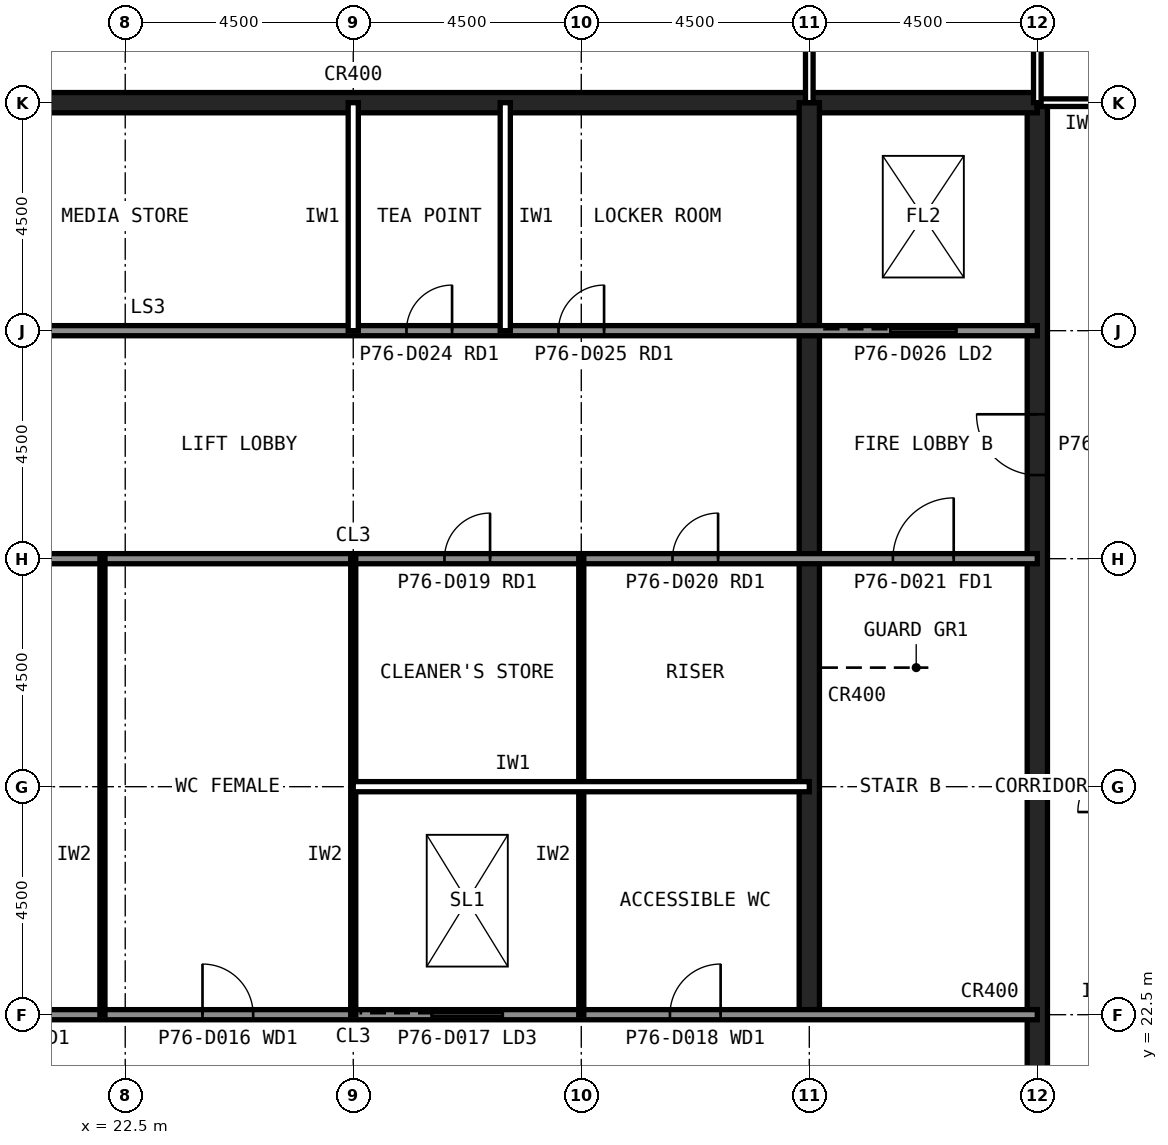
"""IFC4 building model, lengths in metres.
Left out: names, types, materials, properties, quantities, classifications, styles, units other than length and angle.
Written with IfcOpenShell. Run it as: python <this file> out.ifc"""

import sys

from ifc_helpers import new_model, si_unit, direction, frame, frame_2d, origin, place, context, subcontext, project, spatial, polyline, rectangle, outline, extrude, element, fill, save


model = new_model("IFC4")
c1 = context("Model", 3, precision=1e-05, world=origin(), true_north=direction((0.0, 1.0)))
c2 = subcontext(c1, "Body", "Model", "MODEL_VIEW")
j1 = project(units=[si_unit("LENGTHUNIT", "METRE"), si_unit("PLANEANGLEUNIT", "RADIAN")], contexts=[c1])
p1 = place(None, origin())
s1 = spatial("IfcSite", under=j1, at=p1, CompositionType="ELEMENT")
p2 = place(p1, origin())
s2 = spatial("IfcBuilding", under=s1, at=p2, CompositionType="ELEMENT")
p3 = place(p2, frame((0.0, 0.0, 320.1)))
s3 = spatial("IfcBuildingStorey", under=s2, at=p3, CompositionType="ELEMENT", Elevation=320.1)
p4 = place(p3, frame((40.5, 13.5, 0.0), z_axis=(0.0, 0.0, 1.0), x_axis=(0.0, 1.0, 0.0)))
e1 = element("IfcWall", 1, at=p4, inside=s3, PredefinedType="SHEAR", context=c2, shape_type="SweptSolid", body=[
    extrude(outline(polyline([(0.0, 0.0), (27.0, 0.0), (27.0, 17.377), (0.0, 9.277), (0.0, 0.0)])), frame((0.0, 0.2, 0.0), z_axis=(0.0, -1.0, 0.0), x_axis=(1.0, 0.0, 0.0)), (0.0, 0.0, 1.0), 0.4),
])
p5 = place(p4, frame((5.85, 0.0, 0.0)))
e2 = element("IfcOpeningElement", 2, at=p5, cuts=e1, PredefinedType="OPENING", context=c2, shape_type="SweptSolid", body=[
    extrude(rectangle(XDim=1.8, YDim=2.1, at=frame_2d((0.9, 1.05))), frame((0.0, 0.21, 0.0), z_axis=(0.0, -1.0, 0.0), x_axis=(1.0, 0.0, 0.0)), (0.0, 0.0, 1.0), 0.42),
])
p6 = place(p4, frame((19.65, 0.0, 0.0)))
e3 = element("IfcOpeningElement", 3, at=p6, cuts=e1, PredefinedType="OPENING", context=c2, shape_type="SweptSolid", body=[
    extrude(rectangle(XDim=1.2, YDim=2.1, at=frame_2d((0.6, 1.05))), frame((0.0, 0.21, 0.0), z_axis=(0.0, -1.0, 0.0), x_axis=(1.0, 0.0, 0.0)), (0.0, 0.0, 1.0), 0.42),
])
p7 = place(p3, frame((40.5, 40.5, 0.0), z_axis=(0.0, 0.0, 1.0), x_axis=(-1.0, 0.0, 0.0)))
e4 = element("IfcWall", 4, at=p7, inside=s3, PredefinedType="SHEAR", context=c2, shape_type="SweptSolid", body=[
    extrude(rectangle(XDim=27.0, YDim=0.4, at=frame_2d((13.5, 0.0))), origin(), (0.0, 0.0, 1.0), 17.377),
])
p8 = place(p3, frame((36.0, 22.5, 0.0), z_axis=(0.0, 0.0, 1.0), x_axis=(0.0, 1.0, 0.0)))
e5 = element("IfcWall", 5, at=p8, inside=s3, PredefinedType="SHEAR", context=c2, shape_type="SweptSolid", body=[
    extrude(outline(polyline([(0.0, 0.0), (18.0, 0.0), (18.0, 17.377), (0.0, 11.977), (0.0, 0.0)])), frame((0.0, 0.2, 0.0), z_axis=(0.0, -1.0, 0.0), x_axis=(1.0, 0.0, 0.0)), (0.0, 0.0, 1.0), 0.4),
])
p9 = place(p3, frame((13.5, 36.0, 0.0), z_axis=(0.0, 0.0, 1.0), x_axis=(1.0, 0.0, 0.0)))
e6 = element("IfcWall", 6, at=p9, inside=s3, PredefinedType="SOLIDWALL", context=c2, shape_type="SweptSolid", body=[
    extrude(rectangle(XDim=27.0, YDim=0.2, at=frame_2d((13.5, 0.0))), origin(), (0.0, 0.0, 1.0), 15.877),
])
p10 = place(p9, frame((1.8, 0.0, 0.0)))
e7 = element("IfcOpeningElement", 7, at=p10, cuts=e6, PredefinedType="OPENING", context=c2, shape_type="SweptSolid", body=[
    extrude(rectangle(XDim=0.9, YDim=2.1, at=frame_2d((0.45, 1.05))), frame((0.0, 0.11, 0.0), z_axis=(0.0, -1.0, 0.0), x_axis=(1.0, 0.0, 0.0)), (0.0, 0.0, 1.0), 0.22),
])
p11 = place(p9, frame((5.55, 0.0, 0.0)))
e8 = element("IfcOpeningElement", 8, at=p11, cuts=e6, PredefinedType="OPENING", context=c2, shape_type="SweptSolid", body=[
    extrude(rectangle(XDim=0.9, YDim=2.1, at=frame_2d((0.45, 1.05))), frame((0.0, 0.11, 0.0), z_axis=(0.0, -1.0, 0.0), x_axis=(1.0, 0.0, 0.0)), (0.0, 0.0, 1.0), 0.22),
])
p12 = place(p9, frame((14.55, 0.0, 0.0)))
e9 = element("IfcOpeningElement", 9, at=p12, cuts=e6, PredefinedType="OPENING", context=c2, shape_type="SweptSolid", body=[
    extrude(rectangle(XDim=0.9, YDim=2.1, at=frame_2d((0.45, 1.05))), frame((0.0, 0.11, 0.0), z_axis=(0.0, -1.0, 0.0), x_axis=(1.0, 0.0, 0.0)), (0.0, 0.0, 1.0), 0.22),
])
p13 = place(p9, frame((17.55, 0.0, 0.0)))
e10 = element("IfcOpeningElement", 10, at=p13, cuts=e6, PredefinedType="OPENING", context=c2, shape_type="SweptSolid", body=[
    extrude(rectangle(XDim=0.9, YDim=2.1, at=frame_2d((0.45, 1.05))), frame((0.0, 0.11, 0.0), z_axis=(0.0, -1.0, 0.0), x_axis=(1.0, 0.0, 0.0)), (0.0, 0.0, 1.0), 0.22),
])
p14 = place(p9, frame((24.1, 0.0, 0.0)))
e11 = element("IfcOpeningElement", 11, at=p14, cuts=e6, PredefinedType="OPENING", context=c2, shape_type="SweptSolid", body=[
    extrude(rectangle(XDim=1.3, YDim=2.2, at=frame_2d((0.65, 1.1))), frame((0.0, 0.11, 0.0), z_axis=(0.0, -1.0, 0.0), x_axis=(1.0, 0.0, 0.0)), (0.0, 0.0, 1.0), 0.22),
])
p15 = place(p3, frame((13.5, 22.5, 0.0), z_axis=(0.0, 0.0, 1.0), x_axis=(1.0, 0.0, 0.0)))
e12 = element("IfcWall", 12, at=p15, inside=s3, PredefinedType="SOLIDWALL", context=c2, shape_type="SweptSolid", body=[
    extrude(rectangle(XDim=27.0, YDim=0.2, at=frame_2d((13.5, 0.0))), origin(), (0.0, 0.0, 1.0), 11.827),
])
p16 = place(p15, frame((1.65, 0.0, 0.0)))
e13 = element("IfcOpeningElement", 13, at=p16, cuts=e12, PredefinedType="OPENING", context=c2, shape_type="SweptSolid", body=[
    extrude(rectangle(XDim=1.2, YDim=2.1, at=frame_2d((0.6, 1.05))), frame((0.0, 0.11, 0.0), z_axis=(0.0, -1.0, 0.0), x_axis=(1.0, 0.0, 0.0)), (0.0, 0.0, 1.0), 0.22),
])
p17 = place(p15, frame((6.025, 0.0, 0.0)))
e14 = element("IfcOpeningElement", 14, at=p17, cuts=e12, PredefinedType="OPENING", context=c2, shape_type="SweptSolid", body=[
    extrude(rectangle(XDim=1.0, YDim=2.1, at=frame_2d((0.5, 1.05))), frame((0.0, 0.11, 0.0), z_axis=(0.0, -1.0, 0.0), x_axis=(1.0, 0.0, 0.0)), (0.0, 0.0, 1.0), 0.22),
])
p18 = place(p15, frame((10.525, 0.0, 0.0)))
e15 = element("IfcOpeningElement", 15, at=p18, cuts=e12, PredefinedType="OPENING", context=c2, shape_type="SweptSolid", body=[
    extrude(rectangle(XDim=1.0, YDim=2.1, at=frame_2d((0.5, 1.05))), frame((0.0, 0.11, 0.0), z_axis=(0.0, -1.0, 0.0), x_axis=(1.0, 0.0, 0.0)), (0.0, 0.0, 1.0), 0.22),
])
p19 = place(p15, frame((19.75, 0.0, 0.0)))
e16 = element("IfcOpeningElement", 16, at=p19, cuts=e12, PredefinedType="OPENING", context=c2, shape_type="SweptSolid", body=[
    extrude(rectangle(XDim=1.0, YDim=2.1, at=frame_2d((0.5, 1.05))), frame((0.0, 0.11, 0.0), z_axis=(0.0, -1.0, 0.0), x_axis=(1.0, 0.0, 0.0)), (0.0, 0.0, 1.0), 0.22),
])
p20 = place(p15, frame((15.05, 0.0, 0.0)))
e17 = element("IfcOpeningElement", 17, at=p20, cuts=e12, PredefinedType="OPENING", context=c2, shape_type="SweptSolid", body=[
    extrude(rectangle(XDim=1.4, YDim=2.4, at=frame_2d((0.7, 1.2))), frame((0.0, 0.11, 0.0), z_axis=(0.0, -1.0, 0.0), x_axis=(1.0, 0.0, 0.0)), (0.0, 0.0, 1.0), 0.22),
])
p21 = place(p3, frame((13.5, 31.5, 0.0), z_axis=(0.0, 0.0, 1.0), x_axis=(1.0, 0.0, 0.0)))
e18 = element("IfcWall", 18, at=p21, inside=s3, PredefinedType="SOLIDWALL", context=c2, shape_type="SweptSolid", body=[
    extrude(rectangle(XDim=27.0, YDim=0.2, at=frame_2d((13.5, 0.0))), origin(), (0.0, 0.0, 1.0), 14.527),
])
p22 = place(p21, frame((24.15, 0.0, 0.0)))
e19 = element("IfcOpeningElement", 19, at=p22, cuts=e18, PredefinedType="OPENING", context=c2, shape_type="SweptSolid", body=[
    extrude(rectangle(XDim=1.2, YDim=2.1, at=frame_2d((0.6, 1.05))), frame((0.0, 0.11, 0.0), z_axis=(0.0, -1.0, 0.0), x_axis=(1.0, 0.0, 0.0)), (0.0, 0.0, 1.0), 0.22),
])
p23 = place(p21, frame((15.3, 0.0, 0.0)))
e20 = element("IfcOpeningElement", 20, at=p23, cuts=e18, PredefinedType="OPENING", context=c2, shape_type="SweptSolid", body=[
    extrude(rectangle(XDim=0.9, YDim=2.1, at=frame_2d((0.45, 1.05))), frame((0.0, 0.11, 0.0), z_axis=(0.0, -1.0, 0.0), x_axis=(1.0, 0.0, 0.0)), (0.0, 0.0, 1.0), 0.22),
])
p24 = place(p21, frame((19.8, 0.0, 0.0)))
e21 = element("IfcOpeningElement", 21, at=p24, cuts=e18, PredefinedType="OPENING", context=c2, shape_type="SweptSolid", body=[
    extrude(rectangle(XDim=0.9, YDim=2.1, at=frame_2d((0.45, 1.05))), frame((0.0, 0.11, 0.0), z_axis=(0.0, -1.0, 0.0), x_axis=(1.0, 0.0, 0.0)), (0.0, 0.0, 1.0), 0.22),
])
p25 = place(p3, frame((36.261, 54.63, 0.0), z_axis=(0.0, 0.0, 1.0), x_axis=(0.707106781187, -0.707106781187, 0.0)))
e22 = element("IfcWall", 22, at=p25, inside=s3, PredefinedType="SOLIDWALL", context=c2, shape_type="SweptSolid", body=[
    extrude(outline(polyline([(0.0, 0.0), (25.978, 0.0), (25.978, 18.278), (0.0, 23.789), (0.0, 0.0)])), frame((0.0, 0.15, 0.0), z_axis=(0.0, -1.0, 0.0), x_axis=(1.0, 0.0, 0.0)), (0.0, 0.0, 1.0), 0.3),
])
p26 = place(p25, frame((0.424, 0.0, 1.2)))
e23 = element("IfcOpeningElement", 23, at=p26, cuts=e22, PredefinedType="OPENING", context=c2, shape_type="SweptSolid", body=[
    extrude(rectangle(XDim=2.4, YDim=2.4, at=frame_2d((1.2, 1.2))), frame((0.0, 0.16, 0.0), z_axis=(0.0, -1.0, 0.0), x_axis=(1.0, 0.0, 0.0)), (0.0, 0.0, 1.0), 0.32),
])
p27 = place(p25, frame((3.671, 0.0, 1.2)))
e24 = element("IfcOpeningElement", 24, at=p27, cuts=e22, PredefinedType="OPENING", context=c2, shape_type="SweptSolid", body=[
    extrude(rectangle(XDim=2.4, YDim=2.4, at=frame_2d((1.2, 1.2))), frame((0.0, 0.16, 0.0), z_axis=(0.0, -1.0, 0.0), x_axis=(1.0, 0.0, 0.0)), (0.0, 0.0, 1.0), 0.32),
])
p28 = place(p25, frame((6.918, 0.0, 11.3)))
e25 = element("IfcOpeningElement", 25, at=p28, cuts=e22, PredefinedType="OPENING", context=c2, shape_type="SweptSolid", body=[
    extrude(rectangle(XDim=2.4, YDim=2.4, at=frame_2d((1.2, 1.2))), frame((0.0, 0.16, 0.0), z_axis=(0.0, -1.0, 0.0), x_axis=(1.0, 0.0, 0.0)), (0.0, 0.0, 1.0), 0.32),
])
p29 = place(p25, frame((10.165, 0.0, 11.15)))
e26 = element("IfcOpeningElement", 26, at=p29, cuts=e22, PredefinedType="OPENING", context=c2, shape_type="SweptSolid", body=[
    extrude(rectangle(XDim=2.4, YDim=2.4, at=frame_2d((1.2, 1.2))), frame((0.0, 0.16, 0.0), z_axis=(0.0, -1.0, 0.0), x_axis=(1.0, 0.0, 0.0)), (0.0, 0.0, 1.0), 0.32),
])
p30 = place(p25, frame((13.412, 0.0, 1.2)))
e27 = element("IfcOpeningElement", 27, at=p30, cuts=e22, PredefinedType="OPENING", context=c2, shape_type="SweptSolid", body=[
    extrude(rectangle(XDim=2.4, YDim=2.4, at=frame_2d((1.2, 1.2))), frame((0.0, 0.16, 0.0), z_axis=(0.0, -1.0, 0.0), x_axis=(1.0, 0.0, 0.0)), (0.0, 0.0, 1.0), 0.32),
])
p31 = place(p25, frame((16.66, 0.0, 1.2)))
e28 = element("IfcOpeningElement", 28, at=p31, cuts=e22, PredefinedType="OPENING", context=c2, shape_type="SweptSolid", body=[
    extrude(rectangle(XDim=2.4, YDim=2.4, at=frame_2d((1.2, 1.2))), frame((0.0, 0.16, 0.0), z_axis=(0.0, -1.0, 0.0), x_axis=(1.0, 0.0, 0.0)), (0.0, 0.0, 1.0), 0.32),
])
p32 = place(p25, frame((19.907, 0.0, 1.2)))
e29 = element("IfcOpeningElement", 29, at=p32, cuts=e22, PredefinedType="OPENING", context=c2, shape_type="SweptSolid", body=[
    extrude(rectangle(XDim=2.4, YDim=2.4, at=frame_2d((1.2, 1.2))), frame((0.0, 0.16, 0.0), z_axis=(0.0, -1.0, 0.0), x_axis=(1.0, 0.0, 0.0)), (0.0, 0.0, 1.0), 0.32),
])
p33 = place(p25, frame((23.154, 0.0, 1.2)))
e30 = element("IfcOpeningElement", 30, at=p33, cuts=e22, PredefinedType="OPENING", context=c2, shape_type="SweptSolid", body=[
    extrude(rectangle(XDim=2.4, YDim=2.4, at=frame_2d((1.2, 1.2))), frame((0.0, 0.16, 0.0), z_axis=(0.0, -1.0, 0.0), x_axis=(1.0, 0.0, 0.0)), (0.0, 0.0, 1.0), 0.32),
])
for number, where, z_axis, x_axis in (
    (31, (27.0, 36.0, 0.0), (0.0, 0.0, 1.0), (0.0, 1.0, 0.0)),
    (32, (30.0, 36.0, 0.0), (0.0, 0.0, 1.0), (0.0, 1.0, 0.0)),
):
    element("IfcWall", number, at=place(p3, frame(where, z_axis=z_axis, x_axis=x_axis)), inside=s3, PredefinedType="PARTITIONING", context=c2, shape_type="SweptSolid", body=[
        extrude(rectangle(XDim=4.5, YDim=0.2, at=frame_2d((2.25, 0.0))), origin(), (0.0, 0.0, 1.0), 4.2),
    ])
for number, where, z_axis, x_axis in (
    (33, (22.05, 22.5, 0.0), (0.0, 0.0, 1.0), (0.0, 1.0, 0.0)),
    (34, (27.0, 22.5, 0.0), (0.0, 0.0, 1.0), (0.0, 1.0, 0.0)),
    (35, (31.5, 22.5, 0.0), (0.0, 0.0, 1.0), (0.0, 1.0, 0.0)),
):
    element("IfcWall", number, at=place(p3, frame(where, z_axis=z_axis, x_axis=x_axis)), inside=s3, PredefinedType="PLUMBINGWALL", context=c2, shape_type="SweptSolid", body=[
        extrude(rectangle(XDim=9.0, YDim=0.1, at=frame_2d((4.5, 0.0))), origin(), (0.0, 0.0, 1.0), 4.246),
    ])
p34 = place(p3, frame((27.0, 27.0, 0.0), z_axis=(0.0, 0.0, 1.0), x_axis=(1.0, 0.0, 0.0)))
e36 = element("IfcWall", 36, at=p34, inside=s3, PredefinedType="PARTITIONING", context=c2, shape_type="SweptSolid", body=[
    extrude(rectangle(XDim=9.0, YDim=0.2, at=frame_2d((4.5, 0.0))), origin(), (0.0, 0.0, 1.0), 4.2),
])
p35 = place(p3, frame((42.3, 40.5, 0.0), z_axis=(0.0, 0.0, 1.0), x_axis=(-1.0, 0.0, 0.0)))
e37 = element("IfcWall", 37, at=p35, inside=s3, PredefinedType="PARTITIONING", context=c2, shape_type="SweptSolid", body=[
    extrude(rectangle(XDim=1.81, YDim=0.15, at=frame_2d((0.905, 0.0))), origin(), (0.0, 0.0, 1.0), 4.246),
])
p36 = place(p3, frame((36.0, 40.5, 0.0), z_axis=(0.0, 0.0, 1.0), x_axis=(0.0, 1.0, 0.0)))
e38 = element("IfcWall", 38, at=p36, inside=s3, PredefinedType="PARTITIONING", context=c2, shape_type="SweptSolid", body=[
    extrude(rectangle(XDim=4.5, YDim=0.15, at=frame_2d((2.25, 0.0))), origin(), (0.0, 0.0, 1.0), 4.246),
])
p37 = place(p3, frame((40.5, 49.08, 0.0), z_axis=(0.0, 0.0, 1.0), x_axis=(0.0, -1.0, 0.0)))
e39 = element("IfcWall", 39, at=p37, inside=s3, PredefinedType="PARTITIONING", context=c2, shape_type="SweptSolid", body=[
    extrude(rectangle(XDim=8.58, YDim=0.15, at=frame_2d((4.29, 0.0))), origin(), (0.0, 0.0, 1.0), 4.246),
])
p38 = place(p37, frame((3.79, 0.0, 0.0)))
e40 = element("IfcOpeningElement", 40, at=p38, cuts=e39, PredefinedType="OPENING", context=c2, shape_type="SweptSolid", body=[
    extrude(rectangle(XDim=1.0, YDim=2.1, at=frame_2d((0.5, 1.05))), frame((0.0, 0.085, 0.0), z_axis=(0.0, -1.0, 0.0), x_axis=(1.0, 0.0, 0.0)), (0.0, 0.0, 1.0), 0.17),
])
p39 = place(p6, origin())
e41 = element("IfcDoor", 41, at=p39, inside=s3, OperationType="SINGLE_SWING_RIGHT", PredefinedType="DOOR", context=c2, shape_type="SweptSolid", body=[
    extrude(rectangle(XDim=1.2, YDim=2.1, at=frame_2d((0.6, 1.05))), frame((0.0, 0.025, 0.0), z_axis=(0.0, -1.0, 0.0), x_axis=(1.0, 0.0, 0.0)), (0.0, 0.0, 1.0), 0.05),
])
fill(e3, e41)
p40 = place(p22, origin())
e42 = element("IfcDoor", 42, at=p40, inside=s3, OperationType="SINGLE_SWING_RIGHT", PredefinedType="DOOR", context=c2, shape_type="SweptSolid", body=[
    extrude(rectangle(XDim=1.2, YDim=2.1, at=frame_2d((0.6, 1.05))), frame((0.0, 0.025, 0.0), z_axis=(0.0, -1.0, 0.0), x_axis=(1.0, 0.0, 0.0)), (0.0, 0.0, 1.0), 0.05),
])
fill(e19, e42)
p41 = place(p18, origin())
e43 = element("IfcDoor", 43, at=p41, inside=s3, OperationType="SINGLE_SWING_LEFT", PredefinedType="DOOR", context=c2, shape_type="SweptSolid", body=[
    extrude(rectangle(XDim=1.0, YDim=2.1, at=frame_2d((0.5, 1.05))), frame((0.0, 0.025, 0.0), z_axis=(0.0, -1.0, 0.0), x_axis=(1.0, 0.0, 0.0)), (0.0, 0.0, 1.0), 0.05),
])
fill(e15, e43)
p42 = place(p19, origin())
e44 = element("IfcDoor", 44, at=p42, inside=s3, OperationType="SINGLE_SWING_RIGHT", PredefinedType="DOOR", context=c2, shape_type="SweptSolid", body=[
    extrude(rectangle(XDim=1.0, YDim=2.1, at=frame_2d((0.5, 1.05))), frame((0.0, 0.025, 0.0), z_axis=(0.0, -1.0, 0.0), x_axis=(1.0, 0.0, 0.0)), (0.0, 0.0, 1.0), 0.05),
])
fill(e16, e44)
p43 = place(p23, origin())
e45 = element("IfcDoor", 45, at=p43, inside=s3, OperationType="SINGLE_SWING_RIGHT", PredefinedType="DOOR", context=c2, shape_type="SweptSolid", body=[
    extrude(rectangle(XDim=0.9, YDim=2.1, at=frame_2d((0.45, 1.05))), frame((0.0, 0.025, 0.0), z_axis=(0.0, -1.0, 0.0), x_axis=(1.0, 0.0, 0.0)), (0.0, 0.0, 1.0), 0.05),
])
fill(e20, e45)
p44 = place(p24, origin())
e46 = element("IfcDoor", 46, at=p44, inside=s3, OperationType="SINGLE_SWING_RIGHT", PredefinedType="DOOR", context=c2, shape_type="SweptSolid", body=[
    extrude(rectangle(XDim=0.9, YDim=2.1, at=frame_2d((0.45, 1.05))), frame((0.0, 0.025, 0.0), z_axis=(0.0, -1.0, 0.0), x_axis=(1.0, 0.0, 0.0)), (0.0, 0.0, 1.0), 0.05),
])
fill(e21, e46)
p45 = place(p12, origin())
e47 = element("IfcDoor", 47, at=p45, inside=s3, OperationType="SINGLE_SWING_RIGHT", PredefinedType="DOOR", context=c2, shape_type="SweptSolid", body=[
    extrude(rectangle(XDim=0.9, YDim=2.1, at=frame_2d((0.45, 1.05))), frame((0.0, 0.025, 0.0), z_axis=(0.0, -1.0, 0.0), x_axis=(1.0, 0.0, 0.0)), (0.0, 0.0, 1.0), 0.05),
])
fill(e9, e47)
p46 = place(p13, origin())
e48 = element("IfcDoor", 48, at=p46, inside=s3, OperationType="SINGLE_SWING_RIGHT", PredefinedType="DOOR", context=c2, shape_type="SweptSolid", body=[
    extrude(rectangle(XDim=0.9, YDim=2.1, at=frame_2d((0.45, 1.05))), frame((0.0, 0.025, 0.0), z_axis=(0.0, -1.0, 0.0), x_axis=(1.0, 0.0, 0.0)), (0.0, 0.0, 1.0), 0.05),
])
fill(e10, e48)
p47 = place(p14, origin())
e49 = element("IfcDoor", 49, at=p47, inside=s3, OperationType="SLIDING_TO_LEFT", PredefinedType="DOOR", context=c2, shape_type="SweptSolid", body=[
    extrude(rectangle(XDim=1.3, YDim=2.2, at=frame_2d((0.65, 1.1))), frame((0.0, 0.025, 0.0), z_axis=(0.0, -1.0, 0.0), x_axis=(1.0, 0.0, 0.0)), (0.0, 0.0, 1.0), 0.05),
])
fill(e11, e49)
p48 = place(p20, origin())
e50 = element("IfcDoor", 50, at=p48, inside=s3, OperationType="SLIDING_TO_LEFT", PredefinedType="DOOR", context=c2, shape_type="SweptSolid", body=[
    extrude(rectangle(XDim=1.4, YDim=2.4, at=frame_2d((0.7, 1.2))), frame((0.0, 0.025, 0.0), z_axis=(0.0, -1.0, 0.0), x_axis=(1.0, 0.0, 0.0)), (0.0, 0.0, 1.0), 0.05),
])
fill(e17, e50)
save(model, sys.argv[1])
